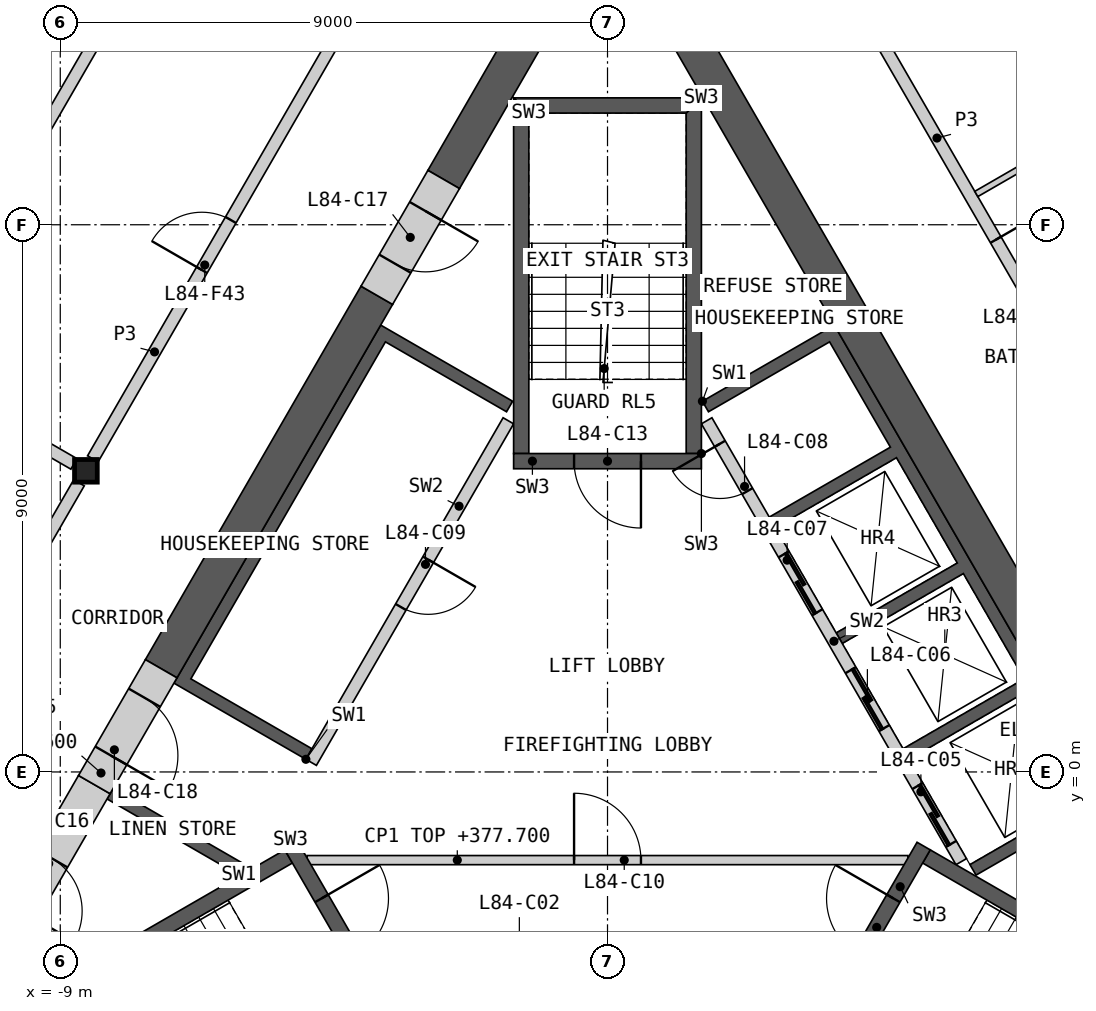
"""IFC4 building model, lengths in metres.
Left out: names, types, materials, properties, quantities, classifications, styles, units other than length and angle.
Written with IfcOpenShell. Run it as: python <this file> out.ifc"""

import sys

from ifc_helpers import new_model, si_unit, direction, frame, frame_2d, origin, origin_2d, place, context, subcontext, project, spatial, polyline, rectangle, i_section, outline, extrude, element, fill, save


model = new_model("IFC4")
c1 = context("Model", 3, precision=1e-05, world=origin(), true_north=direction((0.0, 1.0)))
c2 = subcontext(c1, "Body", "Model", "MODEL_VIEW")
j1 = project(units=[si_unit("LENGTHUNIT", "METRE"), si_unit("PLANEANGLEUNIT", "RADIAN")], contexts=[c1])
p1 = place(None, origin())
s1 = spatial("IfcSite", under=j1, at=p1, CompositionType="ELEMENT")
p2 = place(p1, origin())
s2 = spatial("IfcBuilding", under=s1, at=p2, CompositionType="ELEMENT")
p3 = place(p2, frame((0.0, 0.0, 374.6)))
s3 = spatial("IfcBuildingStorey", under=s2, at=p3, CompositionType="ELEMENT", Elevation=374.6)
p4 = place(p3, frame((-8.578, 4.953, 0.0), z_axis=(0.0, 0.0, 1.0), x_axis=(1.0, 0.0, 0.0)))
e1 = element("IfcColumn", 1, at=p4, inside=s3, PredefinedType="COLUMN", context=c2, shape_type="SweptSolid", body=[
    extrude(i_section(OverallWidth=0.374, OverallDepth=0.372, WebThickness=0.016, FlangeThickness=0.026, at=origin_2d()), origin(), (0.0, 0.0, 1.0), 3.4),
])
p5 = place(p3, origin())
e2 = element("IfcWall", 2, at=p5, inside=s3, PredefinedType="SHEAR", context=c2, shape_type="SweptSolid", body=[
    extrude(outline(polyline([(1.561, 6.097), (3.731, 7.35), (8.231, -0.444), (6.061, -1.697), (5.96, -1.524), (7.952, -0.374), (6.952, 1.358), (4.96, 0.208), (4.861, 0.381), (6.852, 1.531), (5.852, 3.263), (3.861, 2.113), (3.76, 2.287), (5.752, 3.437), (4.752, 5.169), (2.76, 4.019), (2.66, 4.192), (4.652, 5.342), (3.652, 7.074), (1.66, 5.924), (1.561, 6.097)])), origin(), (0.0, 0.0, 1.0), 3.1),
])
p6 = place(p3, frame((5.817, -1.476, 0.0), z_axis=(0.0, 0.0, 1.0), x_axis=(-0.500002616675, 0.866023893041, 0.0)))
e3 = element("IfcWall", 3, at=p6, inside=s3, PredefinedType="SOLIDWALL", context=c2, shape_type="SweptSolid", body=[
    extrude(rectangle(XDim=8.373, YDim=0.2, at=frame_2d((4.187, 0.0))), origin(), (0.0, 0.0, 1.0), 3.1),
])
p7 = place(p6, frame((0.337, 0.0, 0.0)))
e4 = element("IfcOpeningElement", 4, at=p7, cuts=e3, PredefinedType="OPENING", context=c2, shape_type="SweptSolid", body=[
    extrude(rectangle(XDim=1.1, YDim=2.1, at=frame_2d((0.55, 1.05))), frame((0.0, 0.11, 0.0), z_axis=(0.0, -1.0, 0.0), x_axis=(1.0, 0.0, 0.0)), (0.0, 0.0, 1.0), 0.22),
])
p8 = place(p6, frame((2.537, 0.0, 0.0)))
e5 = element("IfcOpeningElement", 5, at=p8, cuts=e3, PredefinedType="OPENING", context=c2, shape_type="SweptSolid", body=[
    extrude(rectangle(XDim=1.1, YDim=2.1, at=frame_2d((0.55, 1.05))), frame((0.0, 0.11, 0.0), z_axis=(0.0, -1.0, 0.0), x_axis=(1.0, 0.0, 0.0)), (0.0, 0.0, 1.0), 0.22),
])
p9 = place(p6, frame((4.737, 0.0, 0.0)))
e6 = element("IfcOpeningElement", 6, at=p9, cuts=e3, PredefinedType="OPENING", context=c2, shape_type="SweptSolid", body=[
    extrude(rectangle(XDim=1.1, YDim=2.1, at=frame_2d((0.55, 1.05))), frame((0.0, 0.11, 0.0), z_axis=(0.0, -1.0, 0.0), x_axis=(1.0, 0.0, 0.0)), (0.0, 0.0, 1.0), 0.22),
])
p10 = place(p6, frame((7.037, 0.0, 0.0)))
e7 = element("IfcOpeningElement", 7, at=p10, cuts=e3, PredefinedType="OPENING", context=c2, shape_type="SweptSolid", body=[
    extrude(rectangle(XDim=0.9, YDim=2.1, at=frame_2d((0.45, 1.05))), frame((0.0, 0.11, 0.0), z_axis=(0.0, -1.0, 0.0), x_axis=(1.0, 0.0, 0.0)), (0.0, 0.0, 1.0), 0.22),
])
p11 = place(p3, origin())
e8 = element("IfcWall", 8, at=p11, inside=s3, PredefinedType="SHEAR", context=c2, shape_type="SweptSolid", body=[
    extrude(outline(polyline([(-6.061, -1.697), (-8.231, -0.444), (-8.131, -0.271), (-5.96, -1.524), (-6.061, -1.697)])), origin(), (0.0, 0.0, 1.0), 3.1),
])
p12 = place(p3, origin())
e9 = element("IfcWall", 9, at=p12, inside=s3, PredefinedType="SHEAR", context=c2, shape_type="SweptSolid", body=[
    extrude(outline(polyline([(-4.96, 0.208), (-7.131, 1.461), (-3.731, 7.35), (-1.561, 6.097), (-1.66, 5.924), (-3.652, 7.074), (-6.852, 1.531), (-4.861, 0.381), (-4.96, 0.208)])), origin(), (0.0, 0.0, 1.0), 3.1),
])
p13 = place(p3, frame((-1.631, 5.776, 0.0), z_axis=(0.0, 0.0, 1.0), x_axis=(-0.499992876559, -0.866029516466, 0.0)))
e10 = element("IfcWall", 10, at=p13, inside=s3, PredefinedType="SOLIDWALL", context=c2, shape_type="SweptSolid", body=[
    extrude(rectangle(XDim=6.486, YDim=0.2, at=frame_2d((3.243, 0.0))), origin(), (0.0, 0.0, 1.0), 3.1),
])
p14 = place(p13, frame((2.637, 0.0, 0.0)))
e11 = element("IfcOpeningElement", 11, at=p14, cuts=e10, PredefinedType="OPENING", context=c2, shape_type="SweptSolid", body=[
    extrude(rectangle(XDim=0.9, YDim=2.1, at=frame_2d((0.45, 1.05))), frame((0.0, 0.11, 0.0), z_axis=(0.0, -1.0, 0.0), x_axis=(1.0, 0.0, 0.0)), (0.0, 0.0, 1.0), 0.22),
])
p15 = place(p3, frame((-4.941, -1.45, 0.0), z_axis=(0.0, 0.0, 1.0), x_axis=(1.0, 0.0, 0.0)))
e12 = element("IfcWall", 12, at=p15, inside=s3, PredefinedType="PARTITIONING", context=c2, shape_type="SweptSolid", body=[
    extrude(rectangle(XDim=9.882, YDim=0.15, at=frame_2d((4.941, 0.0))), origin(), (0.0, 0.0, 1.0), 3.1),
])
p16 = place(p15, frame((4.391, 0.0, 0.0)))
e13 = element("IfcOpeningElement", 13, at=p16, cuts=e12, PredefinedType="OPENING", context=c2, shape_type="SweptSolid", body=[
    extrude(rectangle(XDim=1.1, YDim=2.1, at=frame_2d((0.55, 1.05))), frame((0.0, 0.085, 0.0), z_axis=(0.0, -1.0, 0.0), x_axis=(1.0, 0.0, 0.0)), (0.0, 0.0, 1.0), 0.17),
])
p17 = place(p3, origin())
e14 = element("IfcWall", 14, at=p17, inside=s3, PredefinedType="SHEAR", context=c2, shape_type="SweptSolid", body=[
    extrude(outline(polyline([(-5.307, -1.281), (-10.374, -4.206), (-10.032, -4.298), (-5.182, -1.498), (-5.307, -1.281)])), origin(), (0.0, 0.0, 1.0), 3.1),
])
p18 = place(p3, frame((-5.199, -1.219, 0.0), z_axis=(0.0, 0.0, 1.0), x_axis=(0.499982516597, -0.866035497597, 0.0)))
e15 = element("IfcWall", 15, at=p18, inside=s3, PredefinedType="SHEAR", context=c2, shape_type="SweptSolid", body=[
    extrude(rectangle(XDim=3.088, YDim=0.25, at=frame_2d((1.544, 0.0))), origin(), (0.0, 0.0, 1.0), 3.1),
])
p19 = place(p18, frame((0.994, 0.0, 0.0)))
e16 = element("IfcOpeningElement", 16, at=p19, cuts=e15, PredefinedType="OPENING", context=c2, shape_type="SweptSolid", body=[
    extrude(rectangle(XDim=1.1, YDim=2.1, at=frame_2d((0.55, 1.05))), frame((0.0, 0.135, 0.0), z_axis=(0.0, -1.0, 0.0), x_axis=(1.0, 0.0, 0.0)), (0.0, 0.0, 1.0), 0.27),
])
p20 = place(p3, origin())
e17 = element("IfcWall", 17, at=p20, inside=s3, PredefinedType="SHEAR", context=c2, shape_type="SweptSolid", body=[
    extrude(outline(polyline([(10.032, -4.298), (10.374, -4.206), (5.307, -1.281), (5.182, -1.498), (10.032, -4.298)])), origin(), (0.0, 0.0, 1.0), 3.1),
])
p21 = place(p3, frame((3.655, -3.893, 0.0), z_axis=(0.0, 0.0, 1.0), x_axis=(0.499982516597, 0.866035497597, 0.0)))
e18 = element("IfcWall", 18, at=p21, inside=s3, PredefinedType="SHEAR", context=c2, shape_type="SweptSolid", body=[
    extrude(rectangle(XDim=3.088, YDim=0.25, at=frame_2d((1.544, 0.0))), origin(), (0.0, 0.0, 1.0), 3.1),
])
p22 = place(p21, frame((0.994, 0.0, 0.0)))
e19 = element("IfcOpeningElement", 19, at=p22, cuts=e18, PredefinedType="OPENING", context=c2, shape_type="SweptSolid", body=[
    extrude(rectangle(XDim=1.1, YDim=2.1, at=frame_2d((0.55, 1.05))), frame((0.0, 0.135, 0.0), z_axis=(0.0, -1.0, 0.0), x_axis=(1.0, 0.0, 0.0)), (0.0, 0.0, 1.0), 0.27),
])
p23 = place(p3, origin())
e20 = element("IfcWall", 20, at=p23, inside=s3, PredefinedType="SHEAR", context=c2, shape_type="SweptSolid", body=[
    extrude(outline(polyline([(1.544, 5.237), (1.544, 11.087), (1.294, 10.837), (1.294, 5.237), (1.544, 5.237)])), origin(), (0.0, 0.0, 1.0), 3.1),
])
p24 = place(p3, origin())
e21 = element("IfcWall", 21, at=p24, inside=s3, PredefinedType="SHEAR", context=c2, shape_type="SweptSolid", body=[
    extrude(outline(polyline([(1.544, 11.087), (-1.544, 11.087), (-1.294, 10.837), (1.294, 10.837), (1.544, 11.087)])), origin(), (0.0, 0.0, 1.0), 3.1),
])
p25 = place(p3, origin())
e22 = element("IfcWall", 22, at=p25, inside=s3, PredefinedType="SHEAR", context=c2, shape_type="SweptSolid", body=[
    extrude(outline(polyline([(-1.294, 10.837), (-1.544, 11.087), (-1.544, 5.237), (-1.294, 5.237), (-1.294, 10.837)])), origin(), (0.0, 0.0, 1.0), 3.1),
])
p26 = place(p3, frame((1.544, 5.112, 0.0), z_axis=(0.0, 0.0, 1.0), x_axis=(-1.0, 0.0, 0.0)))
e23 = element("IfcWall", 23, at=p26, inside=s3, PredefinedType="SHEAR", context=c2, shape_type="SweptSolid", body=[
    extrude(rectangle(XDim=3.088, YDim=0.25, at=frame_2d((1.544, 0.0))), origin(), (0.0, 0.0, 1.0), 3.1),
])
p27 = place(p26, frame((0.994, 0.0, 0.0)))
e24 = element("IfcOpeningElement", 24, at=p27, cuts=e23, PredefinedType="OPENING", context=c2, shape_type="SweptSolid", body=[
    extrude(rectangle(XDim=1.1, YDim=2.1, at=frame_2d((0.55, 1.05))), frame((0.0, 0.135, 0.0), z_axis=(0.0, -1.0, 0.0), x_axis=(1.0, 0.0, 0.0)), (0.0, 0.0, 1.0), 0.27),
])
p28 = place(p3, frame((8.686, -0.634, 0.0), z_axis=(0.0, 0.0, 1.0), x_axis=(-0.500004601921, 0.866022746848, 0.0)))
e25 = element("IfcWall", 25, at=p28, inside=s3, PredefinedType="SHEAR", context=c2, shape_type="SweptSolid", body=[
    extrude(rectangle(XDim=16.853, YDim=0.6, at=frame_2d((8.426, 0.0))), origin(), (0.0, 0.0, 1.0), 3.1),
])
p29 = place(p3, frame((-3.794, 7.84, 0.0), z_axis=(0.0, 0.0, 1.0), x_axis=(-0.499974747889, -0.866039982607, 0.0)))
e26 = element("IfcWall", 26, at=p29, inside=s3, PredefinedType="SHEAR", context=c2, shape_type="SweptSolid", body=[
    extrude(rectangle(XDim=7.092, YDim=0.6, at=frame_2d((3.546, 0.0))), origin(), (0.0, 0.0, 1.0), 3.1),
])
p30 = place(p3, frame((-0.26, 13.961, 0.0), z_axis=(0.0, 0.0, 1.0), x_axis=(-0.50000604952, -0.866021911064, 0.0)))
e27 = element("IfcWall", 27, at=p30, inside=s3, PredefinedType="SHEAR", context=c2, shape_type="SweptSolid", body=[
    extrude(rectangle(XDim=4.869, YDim=0.6, at=frame_2d((2.434, 0.0))), origin(), (0.0, 0.0, 1.0), 3.1),
])
p31 = place(p3, frame((-8.44, -0.208, 0.0), z_axis=(0.0, 0.0, 1.0), x_axis=(-0.499997052475, -0.866027105532, 0.0)))
e28 = element("IfcWall", 28, at=p31, inside=s3, PredefinedType="SHEAR", context=c2, shape_type="SweptSolid", body=[
    extrude(rectangle(XDim=3.001, YDim=0.6, at=frame_2d((1.501, 0.0))), origin(), (0.0, 0.0, 1.0), 3.1),
])
p32 = place(p31, frame((1.4, 0.0, 0.0)))
e29 = element("IfcOpeningElement", 29, at=p32, cuts=e28, PredefinedType="OPENING", context=c2, shape_type="SweptSolid", body=[
    extrude(rectangle(XDim=1.0, YDim=2.1, at=frame_2d((0.5, 1.05))), frame((0.0, 0.31, 0.0), z_axis=(0.0, -1.0, 0.0), x_axis=(1.0, 0.0, 0.0)), (0.0, 0.0, 1.0), 0.62),
])
p33 = place(p3, frame((-2.694, 9.745, 0.0), z_axis=(0.0, 0.0, 1.0), x_axis=(-0.50002983664, -0.866008176907, 0.0)))
e30 = element("IfcWall", 30, at=p33, inside=s3, PredefinedType="SHEAR", context=c2, shape_type="SweptSolid", body=[
    extrude(rectangle(XDim=2.2, YDim=0.6, at=frame_2d((1.1, 0.0))), origin(), (0.0, 0.0, 1.0), 3.1),
])
p34 = place(p33, frame((0.6, 0.0, 0.0)))
e31 = element("IfcOpeningElement", 31, at=p34, cuts=e30, PredefinedType="OPENING", context=c2, shape_type="SweptSolid", body=[
    extrude(rectangle(XDim=1.0, YDim=2.1, at=frame_2d((0.5, 1.05))), frame((0.0, 0.31, 0.0), z_axis=(0.0, -1.0, 0.0), x_axis=(1.0, 0.0, 0.0)), (0.0, 0.0, 1.0), 0.62),
])
p35 = place(p3, frame((-7.34, 1.698, 0.0), z_axis=(0.0, 0.0, 1.0), x_axis=(-0.50002983664, -0.866008176907, 0.0)))
e32 = element("IfcWall", 32, at=p35, inside=s3, PredefinedType="SHEAR", context=c2, shape_type="SweptSolid", body=[
    extrude(rectangle(XDim=2.2, YDim=0.6, at=frame_2d((1.1, 0.0))), origin(), (0.0, 0.0, 1.0), 3.1),
])
p36 = place(p35, frame((0.55, 0.0, 0.0)))
e33 = element("IfcOpeningElement", 33, at=p36, cuts=e32, PredefinedType="OPENING", context=c2, shape_type="SweptSolid", body=[
    extrude(rectangle(XDim=1.1, YDim=2.1, at=frame_2d((0.55, 1.05))), frame((0.0, 0.31, 0.0), z_axis=(0.0, -1.0, 0.0), x_axis=(1.0, 0.0, 0.0)), (0.0, 0.0, 1.0), 0.62),
])
p37 = place(p3, frame((4.403, 12.185, 0.0), z_axis=(0.0, 0.0, 1.0), x_axis=(0.499992155518, -0.866029932751, 0.0)))
e34 = element("IfcWall", 34, at=p37, inside=s3, PredefinedType="PARTITIONING", context=c2, shape_type="SweptSolid", body=[
    extrude(rectangle(XDim=8.123, YDim=0.2, at=frame_2d((4.062, 0.0))), origin(), (0.0, 0.0, 1.0), 3.1),
])
p38 = place(p37, frame((3.963, 0.0, 0.0)))
e35 = element("IfcOpeningElement", 35, at=p38, cuts=e34, PredefinedType="OPENING", context=c2, shape_type="SweptSolid", body=[
    extrude(rectangle(XDim=1.0, YDim=2.1, at=frame_2d((0.5, 1.05))), frame((0.0, 0.11, 0.0), z_axis=(0.0, -1.0, 0.0), x_axis=(1.0, 0.0, 0.0)), (0.0, 0.0, 1.0), 0.22),
])
p39 = place(p3, frame((-8.465, 5.15, 0.0), z_axis=(0.0, 0.0, 1.0), x_axis=(0.499992155518, 0.866029932751, 0.0)))
e36 = element("IfcWall", 36, at=p39, inside=s3, PredefinedType="PARTITIONING", context=c2, shape_type="SweptSolid", body=[
    extrude(rectangle(XDim=8.123, YDim=0.2, at=frame_2d((4.062, 0.0))), origin(), (0.0, 0.0, 1.0), 3.1),
])
p40 = place(p39, frame((3.587, 0.0, 0.0)))
e37 = element("IfcOpeningElement", 37, at=p40, cuts=e36, PredefinedType="OPENING", context=c2, shape_type="SweptSolid", body=[
    extrude(rectangle(XDim=0.95, YDim=2.1, at=frame_2d((0.475, 1.05))), frame((0.0, 0.11, 0.0), z_axis=(0.0, -1.0, 0.0), x_axis=(1.0, 0.0, 0.0)), (0.0, 0.0, 1.0), 0.22),
])
p41 = place(p3, frame((-12.754, -2.279, 0.0), z_axis=(0.0, 0.0, 1.0), x_axis=(0.500001682468, 0.866024432409, 0.0)))
e38 = element("IfcWall", 38, at=p41, inside=s3, PredefinedType="PARTITIONING", context=c2, shape_type="SweptSolid", body=[
    extrude(rectangle(XDim=8.124, YDim=0.2, at=frame_2d((4.062, 0.0))), origin(), (0.0, 0.0, 1.0), 3.1),
])
p42 = place(p41, frame((3.762, 0.0, 0.0)))
e39 = element("IfcOpeningElement", 39, at=p42, cuts=e38, PredefinedType="OPENING", context=c2, shape_type="SweptSolid", body=[
    extrude(rectangle(XDim=1.0, YDim=2.1, at=frame_2d((0.5, 1.05))), frame((0.0, 0.11, 0.0), z_axis=(0.0, -1.0, 0.0), x_axis=(1.0, 0.0, 0.0)), (0.0, 0.0, 1.0), 0.22),
])
p43 = place(p3, frame((-11.473, 6.74, 0.0), z_axis=(0.0, 0.0, 1.0), x_axis=(0.500001082559, 0.866024778768, 0.0)))
e40 = element("IfcWall", 40, at=p43, inside=s3, PredefinedType="PARTITIONING", context=c2, shape_type="SweptSolid", body=[
    extrude(rectangle(XDim=15.094, YDim=0.2, at=frame_2d((7.547, 0.0))), origin(), (0.0, 0.0, 1.0), 2.33),
])
p44 = place(p43, frame((10.383, 0.0, 0.0)))
e41 = element("IfcOpeningElement", 41, at=p44, cuts=e40, PredefinedType="OPENING", context=c2, shape_type="SweptSolid", body=[
    extrude(rectangle(XDim=0.95, YDim=2.1, at=frame_2d((0.475, 1.05))), frame((0.0, 0.11, 0.0), z_axis=(0.0, -1.0, 0.0), x_axis=(1.0, 0.0, 0.0)), (0.0, 0.0, 1.0), 0.22),
])
p45 = place(p3, frame((-18.869, 10.894, 0.0), z_axis=(0.0, 0.0, 1.0), x_axis=(0.866023724155, -0.500002909193, 0.0)))
e42 = element("IfcWall", 42, at=p45, inside=s3, PredefinedType="PARTITIONING", context=c2, shape_type="SweptSolid", body=[
    extrude(rectangle(XDim=11.655, YDim=0.2, at=frame_2d((5.827, 0.0))), origin(), (0.0, 0.0, 1.0), 2.33),
])
p46 = place(p3, frame((6.065, 9.506, 0.0), z_axis=(0.0, 0.0, 1.0), x_axis=(0.866029020252, 0.499993736042, 0.0)))
e43 = element("IfcWall", 43, at=p46, inside=s3, PredefinedType="PARTITIONING", context=c2, shape_type="SweptSolid", body=[
    extrude(rectangle(XDim=6.907, YDim=0.1, at=frame_2d((3.454, 0.0))), origin(), (0.0, 0.0, 1.0), 2.33),
])
p47 = place(p46, frame((4.798, 0.0, 0.0)))
e44 = element("IfcOpeningElement", 44, at=p47, cuts=e43, PredefinedType="OPENING", context=c2, shape_type="SweptSolid", body=[
    extrude(rectangle(XDim=0.95, YDim=2.1, at=frame_2d((0.475, 1.05))), frame((0.0, 0.06, 0.0), z_axis=(0.0, -1.0, 0.0), x_axis=(1.0, 0.0, 0.0)), (0.0, 0.0, 1.0), 0.12),
])
p48 = place(p7, origin())
e45 = element("IfcDoor", 45, at=p48, inside=s3, OperationType="SLIDING_TO_LEFT", PredefinedType="DOOR", context=c2, shape_type="SweptSolid", body=[
    extrude(rectangle(XDim=1.1, YDim=2.1, at=frame_2d((0.55, 1.05))), frame((0.0, 0.025, 0.0), z_axis=(0.0, -1.0, 0.0), x_axis=(1.0, 0.0, 0.0)), (0.0, 0.0, 1.0), 0.05),
])
fill(e4, e45)
p49 = place(p8, origin())
e46 = element("IfcDoor", 46, at=p49, inside=s3, OperationType="SLIDING_TO_LEFT", PredefinedType="DOOR", context=c2, shape_type="SweptSolid", body=[
    extrude(rectangle(XDim=1.1, YDim=2.1, at=frame_2d((0.55, 1.05))), frame((0.0, 0.025, 0.0), z_axis=(0.0, -1.0, 0.0), x_axis=(1.0, 0.0, 0.0)), (0.0, 0.0, 1.0), 0.05),
])
fill(e5, e46)
p50 = place(p9, origin())
e47 = element("IfcDoor", 47, at=p50, inside=s3, OperationType="SLIDING_TO_LEFT", PredefinedType="DOOR", context=c2, shape_type="SweptSolid", body=[
    extrude(rectangle(XDim=1.1, YDim=2.1, at=frame_2d((0.55, 1.05))), frame((0.0, 0.025, 0.0), z_axis=(0.0, -1.0, 0.0), x_axis=(1.0, 0.0, 0.0)), (0.0, 0.0, 1.0), 0.05),
])
fill(e6, e47)
p51 = place(p10, origin())
e48 = element("IfcDoor", 48, at=p51, inside=s3, OperationType="SINGLE_SWING_RIGHT", PredefinedType="DOOR", context=c2, shape_type="SweptSolid", body=[
    extrude(rectangle(XDim=0.9, YDim=2.1, at=frame_2d((0.45, 1.05))), frame((0.0, 0.025, 0.0), z_axis=(0.0, -1.0, 0.0), x_axis=(1.0, 0.0, 0.0)), (0.0, 0.0, 1.0), 0.05),
])
fill(e7, e48)
p52 = place(p14, origin())
e49 = element("IfcDoor", 49, at=p52, inside=s3, OperationType="SINGLE_SWING_LEFT", PredefinedType="DOOR", context=c2, shape_type="SweptSolid", body=[
    extrude(rectangle(XDim=0.9, YDim=2.1, at=frame_2d((0.45, 1.05))), frame((0.0, 0.025, 0.0), z_axis=(0.0, -1.0, 0.0), x_axis=(1.0, 0.0, 0.0)), (0.0, 0.0, 1.0), 0.05),
])
fill(e11, e49)
p53 = place(p16, origin())
e50 = element("IfcDoor", 50, at=p53, inside=s3, OperationType="SINGLE_SWING_LEFT", PredefinedType="DOOR", context=c2, shape_type="SweptSolid", body=[
    extrude(rectangle(XDim=1.1, YDim=2.1, at=frame_2d((0.55, 1.05))), frame((0.0, 0.025, 0.0), z_axis=(0.0, -1.0, 0.0), x_axis=(1.0, 0.0, 0.0)), (0.0, 0.0, 1.0), 0.05),
])
fill(e13, e50)
p54 = place(p19, origin())
e51 = element("IfcDoor", 51, at=p54, inside=s3, OperationType="SINGLE_SWING_LEFT", PredefinedType="DOOR", context=c2, shape_type="SweptSolid", body=[
    extrude(rectangle(XDim=1.1, YDim=2.1, at=frame_2d((0.55, 1.05))), frame((0.0, 0.025, 0.0), z_axis=(0.0, -1.0, 0.0), x_axis=(1.0, 0.0, 0.0)), (0.0, 0.0, 1.0), 0.05),
])
fill(e16, e51)
p55 = place(p22, origin())
e52 = element("IfcDoor", 52, at=p55, inside=s3, OperationType="SINGLE_SWING_RIGHT", PredefinedType="DOOR", context=c2, shape_type="SweptSolid", body=[
    extrude(rectangle(XDim=1.1, YDim=2.1, at=frame_2d((0.55, 1.05))), frame((0.0, 0.025, 0.0), z_axis=(0.0, -1.0, 0.0), x_axis=(1.0, 0.0, 0.0)), (0.0, 0.0, 1.0), 0.05),
])
fill(e19, e52)
p56 = place(p27, origin())
e53 = element("IfcDoor", 53, at=p56, inside=s3, OperationType="SINGLE_SWING_LEFT", PredefinedType="DOOR", context=c2, shape_type="SweptSolid", body=[
    extrude(rectangle(XDim=1.1, YDim=2.1, at=frame_2d((0.55, 1.05))), frame((0.0, 0.025, 0.0), z_axis=(0.0, -1.0, 0.0), x_axis=(1.0, 0.0, 0.0)), (0.0, 0.0, 1.0), 0.05),
])
fill(e24, e53)
p57 = place(p32, origin())
e54 = element("IfcDoor", 54, at=p57, inside=s3, OperationType="SINGLE_SWING_RIGHT", PredefinedType="DOOR", context=c2, shape_type="SweptSolid", body=[
    extrude(rectangle(XDim=1.0, YDim=2.1, at=frame_2d((0.5, 1.05))), frame((0.0, 0.055, 0.0), z_axis=(0.0, -1.0, 0.0), x_axis=(1.0, 0.0, 0.0)), (0.0, 0.0, 1.0), 0.05),
])
fill(e29, e54)
p58 = place(p34, origin())
e55 = element("IfcDoor", 55, at=p58, inside=s3, OperationType="SINGLE_SWING_LEFT", PredefinedType="DOOR", context=c2, shape_type="SweptSolid", body=[
    extrude(rectangle(XDim=1.0, YDim=2.1, at=frame_2d((0.5, 1.05))), frame((0.0, 0.055, 0.0), z_axis=(0.0, -1.0, 0.0), x_axis=(1.0, 0.0, 0.0)), (0.0, 0.0, 1.0), 0.05),
])
fill(e31, e55)
p59 = place(p36, origin())
e56 = element("IfcDoor", 56, at=p59, inside=s3, OperationType="SINGLE_SWING_RIGHT", PredefinedType="DOOR", context=c2, shape_type="SweptSolid", body=[
    extrude(rectangle(XDim=1.1, YDim=2.1, at=frame_2d((0.55, 1.05))), frame((0.0, 0.055, 0.0), z_axis=(0.0, -1.0, 0.0), x_axis=(1.0, 0.0, 0.0)), (0.0, 0.0, 1.0), 0.05),
])
fill(e33, e56)
p60 = place(p38, origin())
e57 = element("IfcDoor", 57, at=p60, inside=s3, OperationType="SINGLE_SWING_LEFT", PredefinedType="DOOR", context=c2, shape_type="SweptSolid", body=[
    extrude(rectangle(XDim=1.0, YDim=2.1, at=frame_2d((0.5, 1.05))), frame((0.0, 0.025, 0.0), z_axis=(0.0, -1.0, 0.0), x_axis=(1.0, 0.0, 0.0)), (0.0, 0.0, 1.0), 0.05),
])
fill(e35, e57)
p61 = place(p40, origin())
e58 = element("IfcDoor", 58, at=p61, inside=s3, OperationType="SINGLE_SWING_LEFT", PredefinedType="DOOR", context=c2, shape_type="SweptSolid", body=[
    extrude(rectangle(XDim=0.95, YDim=2.1, at=frame_2d((0.475, 1.05))), frame((0.0, 0.025, 0.0), z_axis=(0.0, -1.0, 0.0), x_axis=(1.0, 0.0, 0.0)), (0.0, 0.0, 1.0), 0.05),
])
fill(e37, e58)
save(model, sys.argv[1])
